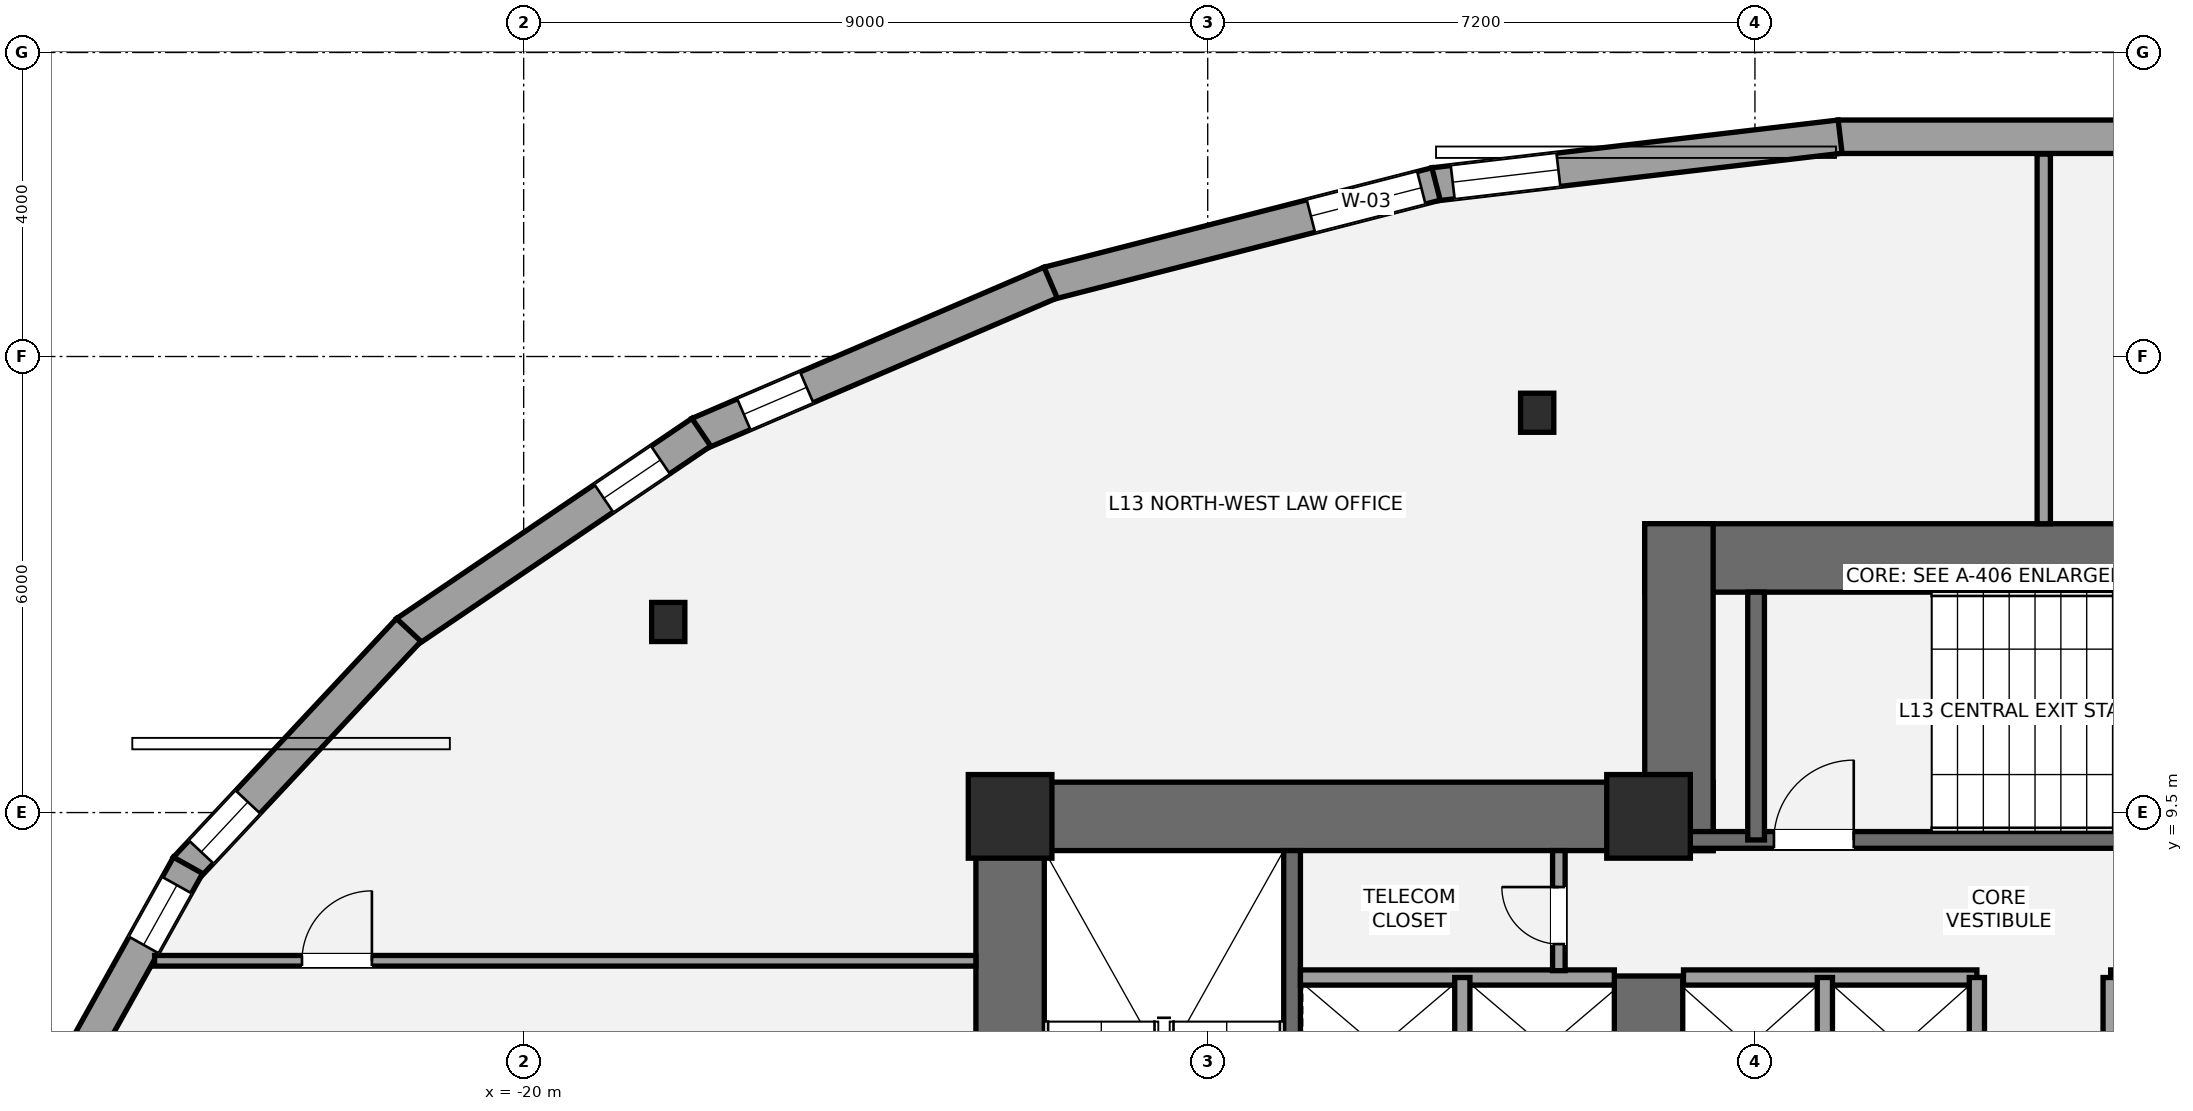
"""IFC4 building model, lengths in metres.
Left out: names, types, materials, properties, quantities, classifications, styles, units other than length and angle.
Written with IfcOpenShell. Run it as: python <this file> out.ifc"""

import sys

from ifc_helpers import new_model, si_unit, direction, frame, frame_2d, origin, origin_2d, place, context, subcontext, project, spatial, rectangle, i_section, extrude, element, fill, save


model = new_model("IFC4")
c1 = context("Model", 3, precision=1e-05, world=origin(), true_north=direction((0.0, 1.0)))
c2 = subcontext(c1, "Body", "Model", "MODEL_VIEW")
j1 = project(units=[si_unit("LENGTHUNIT", "METRE"), si_unit("PLANEANGLEUNIT", "RADIAN")], contexts=[c1])
p1 = place(None, origin())
s1 = spatial("IfcSite", under=j1, at=p1, CompositionType="ELEMENT")
p2 = place(p1, origin())
s2 = spatial("IfcBuilding", under=s1, at=p2, CompositionType="ELEMENT")
p3 = place(p2, frame((0.0, 0.0, 52.2)))
s3 = spatial("IfcBuildingStorey", under=s2, at=p3, CompositionType="ELEMENT", Elevation=52.2)
p4 = place(p3, frame((-13.6, 0.95, 0.0), z_axis=(0.0, 0.0, 1.0), x_axis=(0.0, 1.0, 0.0)))
e1 = element("IfcWall", 1, at=p4, inside=s3, PredefinedType="SHEAR", context=c2, shape_type="SweptSolid", body=[
    extrude(rectangle(XDim=8.95, YDim=0.9, at=frame_2d((4.475, 0.0))), origin(), (0.0, 0.0, 1.0), 3.6),
])
p5 = place(p3, frame((-14.05, 9.45, 0.0), z_axis=(0.0, 0.0, 1.0), x_axis=(1.0, 0.0, 0.0)))
e2 = element("IfcWall", 2, at=p5, inside=s3, PredefinedType="SHEAR", context=c2, shape_type="SweptSolid", body=[
    extrude(rectangle(XDim=9.7, YDim=0.9, at=frame_2d((4.85, 0.0))), origin(), (0.0, 0.0, 1.0), 3.6),
])
p6 = place(p3, frame((-5.2, 5.35, 0.0), z_axis=(0.0, 0.0, 1.0), x_axis=(0.0, 1.0, 0.0)))
e3 = element("IfcWall", 3, at=p6, inside=s3, PredefinedType="SHEAR", context=c2, shape_type="SweptSolid", body=[
    extrude(rectangle(XDim=2.0, YDim=0.9, at=frame_2d((1.0, 0.0))), origin(), (0.0, 0.0, 1.0), 3.6),
])
p7 = place(p3, frame((-9.89, 1.85, 0.0), z_axis=(0.0, 0.0, 1.0), x_axis=(0.0, 1.0, 0.0)))
e4 = element("IfcWall", 4, at=p7, inside=s3, PredefinedType="SHEAR", context=c2, shape_type="SweptSolid", body=[
    extrude(rectangle(XDim=7.15, YDim=0.22, at=frame_2d((3.575, 0.0))), origin(), (0.0, 0.0, 1.0), 3.6),
])
p8 = place(p3, frame((-5.25, 12.85, 0.0), z_axis=(0.0, 0.0, 1.0), x_axis=(1.0, 0.0, 0.0)))
e5 = element("IfcWall", 5, at=p8, inside=s3, PredefinedType="SHEAR", context=c2, shape_type="SweptSolid", body=[
    extrude(rectangle(XDim=10.5, YDim=0.9, at=frame_2d((5.25, 0.0))), origin(), (0.0, 0.0, 1.0), 3.6),
])
p9 = place(p3, frame((-4.8, 9.0, 0.0), z_axis=(0.0, 0.0, 1.0), x_axis=(0.0, 1.0, 0.0)))
e6 = element("IfcWall", 6, at=p9, inside=s3, PredefinedType="SHEAR", context=c2, shape_type="SweptSolid", body=[
    extrude(rectangle(XDim=4.3, YDim=0.9, at=frame_2d((2.15, 0.0))), origin(), (0.0, 0.0, 1.0), 3.6),
])
p10 = place(p3, frame((-4.7, 9.14, 0.0), z_axis=(0.0, 0.0, 1.0), x_axis=(1.0, 0.0, 0.0)))
e7 = element("IfcWall", 7, at=p10, inside=s3, PredefinedType="SHEAR", context=c2, shape_type="SweptSolid", body=[
    extrude(rectangle(XDim=9.3, YDim=0.22, at=frame_2d((4.65, 0.0))), origin(), (0.0, 0.0, 1.0), 3.6),
])
p11 = place(p10, frame((1.15, 0.0, 0.0)))
e8 = element("IfcOpeningElement", 8, at=p11, cuts=e7, PredefinedType="OPENING", context=c2, shape_type="SweptSolid", body=[
    extrude(rectangle(XDim=1.05, YDim=2.15, at=frame_2d((0.525, 1.075))), frame((0.0, 0.12, 0.0), z_axis=(0.0, -1.0, 0.0), x_axis=(1.0, 0.0, 0.0)), (0.0, 0.0, 1.0), 0.24),
])
p12 = place(p3, frame((-3.785, 9.14, 0.0), z_axis=(0.0, 0.0, 1.0), x_axis=(0.0, 1.0, 0.0)))
e9 = element("IfcWall", 9, at=p12, inside=s3, PredefinedType="SHEAR", context=c2, shape_type="SweptSolid", body=[
    extrude(rectangle(XDim=3.26, YDim=0.22, at=frame_2d((1.63, 0.0))), origin(), (0.0, 0.0, 1.0), 3.6),
])
for number, where, z_axis, x_axis in (
    (10, (-13.6, 9.45, 0.0), (0.0, 0.0, 1.0), (1.0, 0.0, 0.0)),
    (11, (-5.2, 9.45, 0.0), (0.0, 0.0, 1.0), (1.0, 0.0, 0.0)),
):
    element("IfcColumn", number, at=place(p3, frame(where, z_axis=z_axis, x_axis=x_axis)), inside=s3, PredefinedType="COLUMN", context=c2, shape_type="SweptSolid", body=[
        extrude(rectangle(XDim=1.1, YDim=1.1, at=origin_2d()), origin(), (0.0, 0.0, 1.0), 3.6),
    ])
for number, where, z_axis, x_axis in (
    (12, (-6.665, 14.76, 0.0), (0.0, 0.0, 1.0), (1.0, 0.0, 0.0)),
    (13, (-18.098, 12.007, 0.0), (0.0, 0.0, 1.0), (1.0, 0.0, 0.0)),
):
    element("IfcColumn", number, at=place(p3, frame(where, z_axis=z_axis, x_axis=x_axis)), inside=s3, PredefinedType="COLUMN", context=c2, shape_type="SweptSolid", body=[
        extrude(i_section(OverallWidth=0.437, OverallDepth=0.514, WebThickness=0.061, FlangeThickness=0.097, at=origin_2d()), origin(), (0.0, 0.0, 1.0), 3.6),
    ])
p13 = place(p3, frame((-2.705, 18.391, 0.0), z_axis=(0.0, 0.0, 1.0), x_axis=(1.0, 0.0, 0.0)))
e14 = element("IfcWall", 14, at=p13, inside=s3, PredefinedType="STANDARD", context=c2, shape_type="SweptSolid", body=[
    extrude(rectangle(XDim=5.41, YDim=0.44, at=frame_2d((2.705, 0.0))), origin(), (0.0, 0.0, 1.0), 2.533),
])
p14 = place(p13, frame((3.761, 0.0, 0.58)))
e15 = element("IfcOpeningElement", 15, at=p14, cuts=e14, PredefinedType="OPENING", context=c2, shape_type="SweptSolid", body=[
    extrude(rectangle(XDim=1.4, YDim=1.55, at=frame_2d((0.7, 0.775))), frame((0.0, 0.23, 0.0), z_axis=(0.0, -1.0, 0.0), x_axis=(1.0, 0.0, 0.0)), (0.0, 0.0, 1.0), 0.46),
])
p15 = place(p3, frame((-8.025, 17.764, 0.0), z_axis=(0.0, 0.0, 1.0), x_axis=(0.993159890371, 0.116762289112, 0.0)))
e16 = element("IfcWall", 16, at=p15, inside=s3, PredefinedType="STANDARD", context=c2, shape_type="SweptSolid", body=[
    extrude(rectangle(XDim=5.382, YDim=0.44, at=frame_2d((2.691, 0.0))), origin(), (0.0, 0.0, 1.0), 2.533),
])
p16 = place(p15, frame((0.25, 0.0, 0.45)))
e17 = element("IfcOpeningElement", 17, at=p16, cuts=e16, PredefinedType="OPENING", context=c2, shape_type="SweptSolid", body=[
    extrude(rectangle(XDim=1.4, YDim=1.55, at=frame_2d((0.7, 0.775))), frame((0.0, 0.23, 0.0), z_axis=(0.0, -1.0, 0.0), x_axis=(1.0, 0.0, 0.0)), (0.0, 0.0, 1.0), 0.46),
])
p17 = place(p3, frame((-13.099, 16.462, 0.0), z_axis=(0.0, 0.0, 1.0), x_axis=(0.968705592422, 0.248212560542, 0.0)))
e18 = element("IfcWall", 18, at=p17, inside=s3, PredefinedType="STANDARD", context=c2, shape_type="SweptSolid", body=[
    extrude(rectangle(XDim=5.268, YDim=0.44, at=frame_2d((2.634, 0.0))), origin(), (0.0, 0.0, 1.0), 2.533),
])
p18 = place(p17, frame((3.568, 0.0, 0.48)))
e19 = element("IfcOpeningElement", 19, at=p18, cuts=e18, PredefinedType="OPENING", context=c2, shape_type="SweptSolid", body=[
    extrude(rectangle(XDim=1.5, YDim=1.7, at=frame_2d((0.75, 0.85))), frame((0.0, 0.23, 0.0), z_axis=(0.0, -1.0, 0.0), x_axis=(1.0, 0.0, 0.0)), (0.0, 0.0, 1.0), 0.46),
])
p19 = place(p3, frame((-17.7, 14.483, 0.0), z_axis=(0.0, 0.0, 1.0), x_axis=(0.918881850071, 0.394532819433, 0.0)))
e20 = element("IfcWall", 20, at=p19, inside=s3, PredefinedType="STANDARD", context=c2, shape_type="SweptSolid", body=[
    extrude(rectangle(XDim=5.042, YDim=0.44, at=frame_2d((2.521, 0.0))), origin(), (0.0, 0.0, 1.0), 2.533),
])
p20 = place(p19, frame((0.649, 0.0, 0.58)))
e21 = element("IfcOpeningElement", 21, at=p20, cuts=e20, PredefinedType="OPENING", context=c2, shape_type="SweptSolid", body=[
    extrude(rectangle(XDim=0.9, YDim=1.35, at=frame_2d((0.45, 0.675))), frame((0.0, 0.23, 0.0), z_axis=(0.0, -1.0, 0.0), x_axis=(1.0, 0.0, 0.0)), (0.0, 0.0, 1.0), 0.46),
])
p21 = place(p3, frame((-21.549, 11.87, 0.0), z_axis=(0.0, 0.0, 1.0), x_axis=(0.827825981515, 0.560984976919, 0.0)))
e22 = element("IfcWall", 22, at=p21, inside=s3, PredefinedType="STANDARD", context=c2, shape_type="SweptSolid", body=[
    extrude(rectangle(XDim=4.695, YDim=0.44, at=frame_2d((2.347, 0.0))), origin(), (0.0, 0.0, 1.0), 2.533),
])
p22 = place(p21, frame((3.145, 0.0, 0.58)))
e23 = element("IfcOpeningElement", 23, at=p22, cuts=e22, PredefinedType="OPENING", context=c2, shape_type="SweptSolid", body=[
    extrude(rectangle(XDim=0.9, YDim=1.35, at=frame_2d((0.45, 0.675))), frame((0.0, 0.23, 0.0), z_axis=(0.0, -1.0, 0.0), x_axis=(1.0, 0.0, 0.0)), (0.0, 0.0, 1.0), 0.46),
])
p23 = place(p3, frame((-24.448, 8.763, 0.0), z_axis=(0.0, 0.0, 1.0), x_axis=(0.68299392258, 0.730424056093, 0.0)))
e24 = element("IfcWall", 24, at=p23, inside=s3, PredefinedType="STANDARD", context=c2, shape_type="SweptSolid", body=[
    extrude(rectangle(XDim=4.298, YDim=0.44, at=frame_2d((2.149, 0.0))), origin(), (0.0, 0.0, 1.0), 2.533),
])
p24 = place(p23, frame((0.3, 0.0, 0.58)))
e25 = element("IfcOpeningElement", 25, at=p24, cuts=e24, PredefinedType="OPENING", context=c2, shape_type="SweptSolid", body=[
    extrude(rectangle(XDim=0.9, YDim=1.35, at=frame_2d((0.45, 0.675))), frame((0.0, 0.23, 0.0), z_axis=(0.0, -1.0, 0.0), x_axis=(1.0, 0.0, 0.0)), (0.0, 0.0, 1.0), 0.46),
])
p25 = place(p3, frame((-26.346, 5.348, 0.0), z_axis=(0.0, 0.0, 1.0), x_axis=(0.487369438963, 0.873195871477, 0.0)))
e26 = element("IfcWall", 26, at=p25, inside=s3, PredefinedType="STANDARD", context=c2, shape_type="SweptSolid", body=[
    extrude(rectangle(XDim=3.96, YDim=0.44, at=frame_2d((1.98, 0.0))), origin(), (0.0, 0.0, 1.0), 2.533),
])
p26 = place(p25, frame((2.761, 0.0, 0.58)))
e27 = element("IfcOpeningElement", 27, at=p26, cuts=e26, PredefinedType="OPENING", context=c2, shape_type="SweptSolid", body=[
    extrude(rectangle(XDim=0.9, YDim=1.35, at=frame_2d((0.45, 0.675))), frame((0.0, 0.23, 0.0), z_axis=(0.0, -1.0, 0.0), x_axis=(1.0, 0.0, 0.0)), (0.0, 0.0, 1.0), 0.46),
])
p27 = place(p3, frame((-9.78, 7.33, 0.0), z_axis=(0.0, 0.0, 1.0), x_axis=(1.0, 0.0, 0.0)))
e28 = element("IfcWall", 28, at=p27, inside=s3, PredefinedType="SOLIDWALL", context=c2, shape_type="SweptSolid", body=[
    extrude(rectangle(XDim=4.13, YDim=0.2, at=frame_2d((2.065, 0.0))), origin(), (0.0, 0.0, 1.0), 3.4),
])
p28 = place(p3, frame((-7.65, 5.47, 0.0), z_axis=(0.0, 0.0, 1.0), x_axis=(0.0, 1.0, 0.0)))
e29 = element("IfcWall", 29, at=p28, inside=s3, PredefinedType="SOLIDWALL", context=c2, shape_type="SweptSolid", body=[
    extrude(rectangle(XDim=1.86, YDim=0.2, at=frame_2d((0.93, 0.0))), origin(), (0.0, 0.0, 1.0), 3.4),
])
for number, where, z_axis, x_axis in (
    (30, (-4.74, 7.33, 0.0), (0.0, 0.0, 1.0), (1.0, 0.0, 0.0)),
    (31, (0.88, 7.33, 0.0), (0.0, 0.0, 1.0), (1.0, 0.0, 0.0)),
):
    element("IfcWall", number, at=place(p3, frame(where, z_axis=z_axis, x_axis=x_axis)), inside=s3, PredefinedType="SOLIDWALL", context=c2, shape_type="SweptSolid", body=[
        extrude(rectangle(XDim=3.86, YDim=0.2, at=frame_2d((1.93, 0.0))), origin(), (0.0, 0.0, 1.0), 3.4),
    ])
for number, where, z_axis, x_axis in (
    (32, (-2.88, 5.52, 0.0), (0.0, 0.0, 1.0), (0.0, 1.0, 0.0)),
    (33, (-0.88, 5.52, 0.0), (0.0, 0.0, 1.0), (0.0, 1.0, 0.0)),
    (34, (0.88, 5.52, 0.0), (0.0, 0.0, 1.0), (0.0, 1.0, 0.0)),
):
    element("IfcWall", number, at=place(p3, frame(where, z_axis=z_axis, x_axis=x_axis)), inside=s3, PredefinedType="SOLIDWALL", context=c2, shape_type="SweptSolid", body=[
        extrude(rectangle(XDim=1.81, YDim=0.2, at=frame_2d((0.905, 0.0))), origin(), (0.0, 0.0, 1.0), 3.4),
    ])
p29 = place(p3, frame((-6.38, 7.42, 0.0), z_axis=(0.0, 0.0, 1.0), x_axis=(0.0, 1.0, 0.0)))
e35 = element("IfcWall", 35, at=p29, inside=s3, PredefinedType="PARTITIONING", context=c2, shape_type="SweptSolid", body=[
    extrude(rectangle(XDim=1.58, YDim=0.165, at=frame_2d((0.79, 0.0))), origin(), (0.0, 0.0, 1.0), 3.4),
])
p30 = place(p29, frame((0.35, 0.0, 0.0)))
e36 = element("IfcOpeningElement", 36, at=p30, cuts=e35, PredefinedType="OPENING", context=c2, shape_type="SweptSolid", body=[
    extrude(rectangle(XDim=0.75, YDim=2.1, at=frame_2d((0.375, 1.05))), frame((0.0, 0.093, 0.0), z_axis=(0.0, -1.0, 0.0), x_axis=(1.0, 0.0, 0.0)), (0.0, 0.0, 1.0), 0.185),
])
p31 = place(p3, frame((-24.856, 7.55, 0.0), z_axis=(0.0, 0.0, 1.0), x_axis=(1.0, 0.0, 0.0)))
e37 = element("IfcWall", 37, at=p31, inside=s3, PredefinedType="PARTITIONING", context=c2, shape_type="SweptSolid", body=[
    extrude(rectangle(XDim=10.806, YDim=0.14, at=frame_2d((5.403, 0.0))), origin(), (0.0, 0.0, 1.0), 2.853),
])
p32 = place(p31, frame((1.939, 0.0, 0.0)))
e38 = element("IfcOpeningElement", 38, at=p32, cuts=e37, PredefinedType="OPENING", context=c2, shape_type="SweptSolid", body=[
    extrude(rectangle(XDim=0.92, YDim=2.15, at=frame_2d((0.46, 1.075))), frame((0.0, 0.08, 0.0), z_axis=(0.0, -1.0, 0.0), x_axis=(1.0, 0.0, 0.0)), (0.0, 0.0, 1.0), 0.16),
])
p33 = place(p3, frame((0.0, 13.3, 0.0), z_axis=(0.0, 0.0, 1.0), x_axis=(0.0, 1.0, 0.0)))
e39 = element("IfcWall", 39, at=p33, inside=s3, PredefinedType="PARTITIONING", context=c2, shape_type="SweptSolid", body=[
    extrude(rectangle(XDim=4.863, YDim=0.175, at=frame_2d((2.432, 0.0))), origin(), (0.0, 0.0, 1.0), 3.4),
])
p34 = place(p16, origin())
e40 = element("IfcWindow", 40, at=p34, inside=s3, PartitioningType="SINGLE_PANEL", PredefinedType="WINDOW", context=c2, shape_type="SweptSolid", body=[
    extrude(rectangle(XDim=1.4, YDim=1.55, at=frame_2d((0.7, 0.775))), frame((0.0, -0.01, 0.0), z_axis=(0.0, -1.0, 0.0), x_axis=(1.0, 0.0, 0.0)), (0.0, 0.0, 1.0), 0.06),
])
fill(e17, e40)
p35 = place(p18, origin())
e41 = element("IfcWindow", 41, at=p35, inside=s3, PartitioningType="SINGLE_PANEL", PredefinedType="WINDOW", context=c2, shape_type="SweptSolid", body=[
    extrude(rectangle(XDim=1.5, YDim=1.7, at=frame_2d((0.75, 0.85))), frame((0.0, -0.01, 0.0), z_axis=(0.0, -1.0, 0.0), x_axis=(1.0, 0.0, 0.0)), (0.0, 0.0, 1.0), 0.06),
])
fill(e19, e41)
p36 = place(p20, origin())
e42 = element("IfcWindow", 42, at=p36, inside=s3, PartitioningType="SINGLE_PANEL", PredefinedType="WINDOW", context=c2, shape_type="SweptSolid", body=[
    extrude(rectangle(XDim=0.9, YDim=1.35, at=frame_2d((0.45, 0.675))), frame((0.0, -0.01, 0.0), z_axis=(0.0, -1.0, 0.0), x_axis=(1.0, 0.0, 0.0)), (0.0, 0.0, 1.0), 0.06),
])
fill(e21, e42)
p37 = place(p22, origin())
e43 = element("IfcWindow", 43, at=p37, inside=s3, PartitioningType="SINGLE_PANEL", PredefinedType="WINDOW", context=c2, shape_type="SweptSolid", body=[
    extrude(rectangle(XDim=0.9, YDim=1.35, at=frame_2d((0.45, 0.675))), frame((0.0, -0.01, 0.0), z_axis=(0.0, -1.0, 0.0), x_axis=(1.0, 0.0, 0.0)), (0.0, 0.0, 1.0), 0.06),
])
fill(e23, e43)
p38 = place(p24, origin())
e44 = element("IfcWindow", 44, at=p38, inside=s3, PartitioningType="SINGLE_PANEL", PredefinedType="WINDOW", context=c2, shape_type="SweptSolid", body=[
    extrude(rectangle(XDim=0.9, YDim=1.35, at=frame_2d((0.45, 0.675))), frame((0.0, -0.01, 0.0), z_axis=(0.0, -1.0, 0.0), x_axis=(1.0, 0.0, 0.0)), (0.0, 0.0, 1.0), 0.06),
])
fill(e25, e44)
p39 = place(p26, origin())
e45 = element("IfcWindow", 45, at=p39, inside=s3, PartitioningType="SINGLE_PANEL", PredefinedType="WINDOW", context=c2, shape_type="SweptSolid", body=[
    extrude(rectangle(XDim=0.9, YDim=1.35, at=frame_2d((0.45, 0.675))), frame((0.0, -0.01, 0.0), z_axis=(0.0, -1.0, 0.0), x_axis=(1.0, 0.0, 0.0)), (0.0, 0.0, 1.0), 0.06),
])
fill(e27, e45)
p40 = place(p11, origin())
e46 = element("IfcDoor", 46, at=p40, inside=s3, OperationType="SINGLE_SWING_RIGHT", PredefinedType="DOOR", context=c2, shape_type="SweptSolid", body=[
    extrude(rectangle(XDim=1.05, YDim=2.15, at=frame_2d((0.525, 1.075))), frame((0.0, 0.025, 0.0), z_axis=(0.0, -1.0, 0.0), x_axis=(1.0, 0.0, 0.0)), (0.0, 0.0, 1.0), 0.05),
])
fill(e8, e46)
p41 = place(p30, origin())
e47 = element("IfcDoor", 47, at=p41, inside=s3, OperationType="SINGLE_SWING_RIGHT", PredefinedType="DOOR", context=c2, shape_type="SweptSolid", body=[
    extrude(rectangle(XDim=0.75, YDim=2.1, at=frame_2d((0.375, 1.05))), frame((0.0, 0.025, 0.0), z_axis=(0.0, -1.0, 0.0), x_axis=(1.0, 0.0, 0.0)), (0.0, 0.0, 1.0), 0.05),
])
fill(e36, e47)
p42 = place(p32, origin())
e48 = element("IfcDoor", 48, at=p42, inside=s3, OperationType="SINGLE_SWING_RIGHT", PredefinedType="DOOR", context=c2, shape_type="SweptSolid", body=[
    extrude(rectangle(XDim=0.92, YDim=2.15, at=frame_2d((0.46, 1.075))), frame((0.0, 0.025, 0.0), z_axis=(0.0, -1.0, 0.0), x_axis=(1.0, 0.0, 0.0)), (0.0, 0.0, 1.0), 0.05),
])
fill(e38, e48)
save(model, sys.argv[1])
